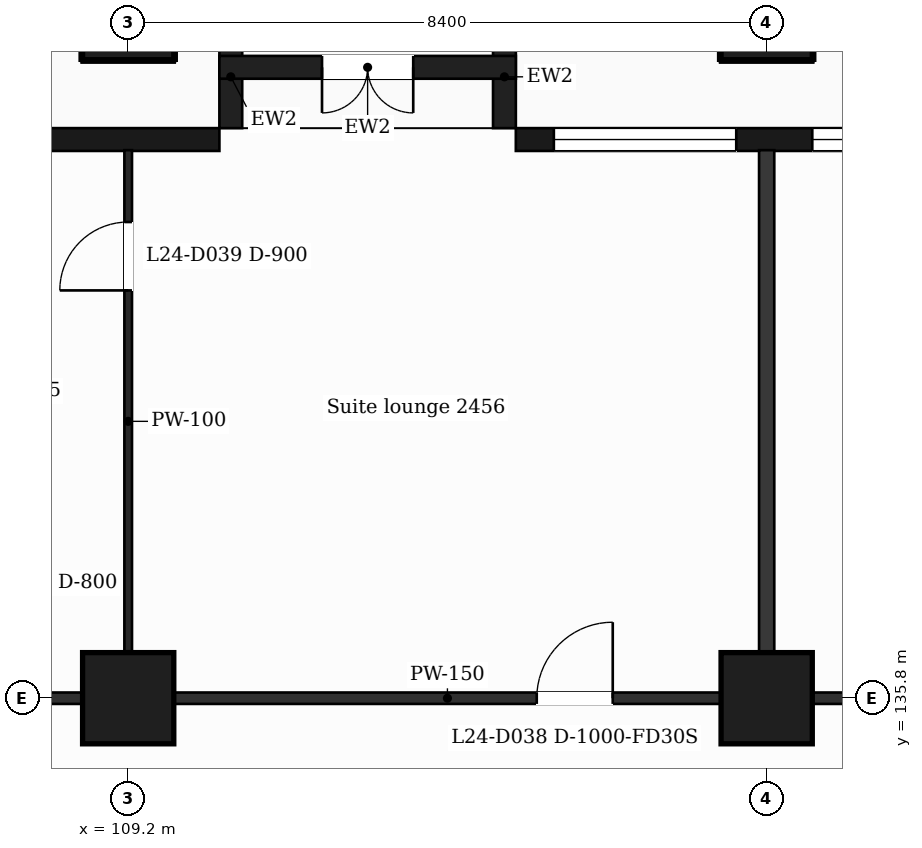
"""IFC4 building model, lengths in metres.
Left out: names, types, materials, properties, quantities, classifications, styles, units other than length and angle.
Written with IfcOpenShell. Run it as: python <this file> out.ifc"""

import sys

from ifc_helpers import new_model, si_unit, direction, frame, frame_2d, origin, origin_2d, place, context, subcontext, project, spatial, rectangle, extrude, element, fill, save


model = new_model("IFC4")
c1 = context("Model", 3, precision=1e-05, world=origin(), true_north=direction((0.0, 1.0)))
c2 = subcontext(c1, "Body", "Model", "MODEL_VIEW")
j1 = project(units=[si_unit("LENGTHUNIT", "METRE"), si_unit("PLANEANGLEUNIT", "RADIAN")], contexts=[c1])
p1 = place(None, origin())
s1 = spatial("IfcSite", under=j1, at=p1, CompositionType="ELEMENT")
p2 = place(p1, origin())
s2 = spatial("IfcBuilding", under=s1, at=p2, CompositionType="ELEMENT")
p3 = place(p2, frame((0.0, 0.0, 105.8)))
s3 = spatial("IfcBuildingStorey", under=s2, at=p3, CompositionType="ELEMENT", Elevation=105.8)
for number, where, z_axis, x_axis in (
    (1, (109.2, 135.8, 0.0), (0.0, 0.0, 1.0), (1.0, 0.0, 0.0)),
    (2, (117.6, 135.8, 0.0), (0.0, 0.0, 1.0), (1.0, 0.0, 0.0)),
    (3, (109.2, 144.8, 0.0), (0.0, 0.0, 1.0), (1.0, 0.0, 0.0)),
    (4, (117.6, 144.8, 0.0), (0.0, 0.0, 1.0), (1.0, 0.0, 0.0)),
):
    element("IfcColumn", number, at=place(p3, frame(where, z_axis=z_axis, x_axis=x_axis)), inside=s3, PredefinedType="COLUMN", context=c2, shape_type="SweptSolid", body=[
        extrude(rectangle(XDim=1.2, YDim=1.2, at=origin_2d()), origin(), (0.0, 0.0, 1.0), 3.7),
    ])
p4 = place(p3, frame((130.65, 143.15, 0.0), z_axis=(0.0, 0.0, 1.0), x_axis=(-1.0, 0.0, 0.0)))
e5 = element("IfcWall", 5, at=p4, inside=s3, PredefinedType="SOLIDWALL", context=c2, shape_type="SweptSolid", body=[
    extrude(rectangle(XDim=16.35, YDim=0.3, at=frame_2d((8.175, 0.0))), origin(), (0.0, 0.0, 1.0), 3.38),
])
p5 = place(p4, frame((1.35, 0.0, 0.9)))
e6 = element("IfcOpeningElement", 6, at=p5, cuts=e5, PredefinedType="OPENING", context=c2, shape_type="SweptSolid", body=[
    extrude(rectangle(XDim=2.4, YDim=2.1, at=frame_2d((1.2, 1.05))), frame((0.0, 0.16, 0.0), z_axis=(0.0, -1.0, 0.0), x_axis=(1.0, 0.0, 0.0)), (0.0, 0.0, 1.0), 0.32),
])
p6 = place(p4, frame((5.55, 0.0, 0.9)))
e7 = element("IfcOpeningElement", 7, at=p6, cuts=e5, PredefinedType="OPENING", context=c2, shape_type="SweptSolid", body=[
    extrude(rectangle(XDim=2.4, YDim=2.1, at=frame_2d((1.2, 1.05))), frame((0.0, 0.16, 0.0), z_axis=(0.0, -1.0, 0.0), x_axis=(1.0, 0.0, 0.0)), (0.0, 0.0, 1.0), 0.32),
])
p7 = place(p4, frame((9.45, 0.0, 0.0)))
e8 = element("IfcOpeningElement", 8, at=p7, cuts=e5, PredefinedType="OPENING", context=c2, shape_type="SweptSolid", body=[
    extrude(rectangle(XDim=1.2, YDim=2.4, at=frame_2d((0.6, 1.2))), frame((0.0, 0.16, 0.0), z_axis=(0.0, -1.0, 0.0), x_axis=(1.0, 0.0, 0.0)), (0.0, 0.0, 1.0), 0.32),
])
p8 = place(p4, frame((11.25, 0.0, 0.9)))
e9 = element("IfcOpeningElement", 9, at=p8, cuts=e5, PredefinedType="OPENING", context=c2, shape_type="SweptSolid", body=[
    extrude(rectangle(XDim=1.2, YDim=2.1, at=frame_2d((0.6, 1.05))), frame((0.0, 0.16, 0.0), z_axis=(0.0, -1.0, 0.0), x_axis=(1.0, 0.0, 0.0)), (0.0, 0.0, 1.0), 0.32),
])
p9 = place(p4, frame((13.45, 0.0, 0.9)))
e10 = element("IfcOpeningElement", 10, at=p9, cuts=e5, PredefinedType="OPENING", context=c2, shape_type="SweptSolid", body=[
    extrude(rectangle(XDim=2.4, YDim=2.1, at=frame_2d((1.2, 1.05))), frame((0.0, 0.16, 0.0), z_axis=(0.0, -1.0, 0.0), x_axis=(1.0, 0.0, 0.0)), (0.0, 0.0, 1.0), 0.32),
])
p10 = place(p3, frame((110.4, 143.15, 0.0), z_axis=(0.0, 0.0, 1.0), x_axis=(-1.0, 0.0, 0.0)))
e11 = element("IfcWall", 11, at=p10, inside=s3, PredefinedType="SOLIDWALL", context=c2, shape_type="SweptSolid", body=[
    extrude(rectangle(XDim=14.4, YDim=0.3, at=frame_2d((7.2, 0.0))), origin(), (0.0, 0.0, 1.0), 3.38),
])
p11 = place(p10, frame((2.7, 0.0, 0.9)))
e12 = element("IfcOpeningElement", 12, at=p11, cuts=e11, PredefinedType="OPENING", context=c2, shape_type="SweptSolid", body=[
    extrude(rectangle(XDim=1.2, YDim=2.1, at=frame_2d((0.6, 1.05))), frame((0.0, 0.16, 0.0), z_axis=(0.0, -1.0, 0.0), x_axis=(1.0, 0.0, 0.0)), (0.0, 0.0, 1.0), 0.32),
])
p12 = place(p10, frame((6.9, 0.0, 0.0)))
e13 = element("IfcOpeningElement", 13, at=p12, cuts=e11, PredefinedType="OPENING", context=c2, shape_type="SweptSolid", body=[
    extrude(rectangle(XDim=1.2, YDim=2.4, at=frame_2d((0.6, 1.2))), frame((0.0, 0.16, 0.0), z_axis=(0.0, -1.0, 0.0), x_axis=(1.0, 0.0, 0.0)), (0.0, 0.0, 1.0), 0.32),
])
p13 = place(p10, frame((10.5, 0.0, 0.9)))
e14 = element("IfcOpeningElement", 14, at=p13, cuts=e11, PredefinedType="OPENING", context=c2, shape_type="SweptSolid", body=[
    extrude(rectangle(XDim=2.4, YDim=2.1, at=frame_2d((1.2, 1.05))), frame((0.0, 0.16, 0.0), z_axis=(0.0, -1.0, 0.0), x_axis=(1.0, 0.0, 0.0)), (0.0, 0.0, 1.0), 0.32),
])
for number, where, z_axis, x_axis in (
    (15, (114.15, 143.3, 0.0), (0.0, 0.0, 1.0), (0.0, 1.0, 0.0)),
    (16, (110.55, 143.3, 0.0), (0.0, 0.0, 1.0), (0.0, 1.0, 0.0)),
):
    element("IfcWall", number, at=place(p3, frame(where, z_axis=z_axis, x_axis=x_axis)), inside=s3, PredefinedType="SOLIDWALL", context=c2, shape_type="SweptSolid", body=[
        extrude(rectangle(XDim=1.35, YDim=0.3, at=frame_2d((0.675, 0.0))), origin(), (0.0, 0.0, 1.0), 3.38),
    ])
p14 = place(p3, frame((114.3, 144.1, 0.0), z_axis=(0.0, 0.0, 1.0), x_axis=(-1.0, 0.0, 0.0)))
e17 = element("IfcWall", 17, at=p14, inside=s3, PredefinedType="SOLIDWALL", context=c2, shape_type="SweptSolid", body=[
    extrude(rectangle(XDim=3.9, YDim=0.3, at=frame_2d((1.95, 0.0))), origin(), (0.0, 0.0, 1.0), 3.38),
])
p15 = place(p14, frame((1.35, 0.0, 0.0)))
e18 = element("IfcOpeningElement", 18, at=p15, cuts=e17, PredefinedType="OPENING", context=c2, shape_type="SweptSolid", body=[
    extrude(rectangle(XDim=1.2, YDim=2.4, at=frame_2d((0.6, 1.2))), frame((0.0, 0.16, 0.0), z_axis=(0.0, -1.0, 0.0), x_axis=(1.0, 0.0, 0.0)), (0.0, 0.0, 1.0), 0.32),
])
p16 = place(p3, frame((90.895, 135.8, 0.0), z_axis=(0.0, 0.0, 1.0), x_axis=(1.0, 0.0, 0.0)))
e19 = element("IfcWall", 19, at=p16, inside=s3, PredefinedType="PARTITIONING", context=c2, shape_type="SweptSolid", body=[
    extrude(rectangle(XDim=45.011, YDim=0.15, at=frame_2d((22.505, 0.0))), origin(), (0.0, 0.0, 1.0), 3.38),
])
p17 = place(p16, frame((7.455, 0.0, 0.0)))
e20 = element("IfcOpeningElement", 20, at=p17, cuts=e19, PredefinedType="OPENING", context=c2, shape_type="SweptSolid", body=[
    extrude(rectangle(XDim=1.0, YDim=2.1, at=frame_2d((0.5, 1.05))), frame((0.0, 0.085, 0.0), z_axis=(0.0, -1.0, 0.0), x_axis=(1.0, 0.0, 0.0)), (0.0, 0.0, 1.0), 0.17),
])
p18 = place(p16, frame((10.892, 0.0, 0.0)))
e21 = element("IfcOpeningElement", 21, at=p18, cuts=e19, PredefinedType="OPENING", context=c2, shape_type="SweptSolid", body=[
    extrude(rectangle(XDim=0.95, YDim=2.1, at=frame_2d((0.475, 1.05))), frame((0.0, 0.085, 0.0), z_axis=(0.0, -1.0, 0.0), x_axis=(1.0, 0.0, 0.0)), (0.0, 0.0, 1.0), 0.17),
])
p19 = place(p16, frame((23.68, 0.0, 0.0)))
e22 = element("IfcOpeningElement", 22, at=p19, cuts=e19, PredefinedType="OPENING", context=c2, shape_type="SweptSolid", body=[
    extrude(rectangle(XDim=1.0, YDim=2.1, at=frame_2d((0.5, 1.05))), frame((0.0, 0.085, 0.0), z_axis=(0.0, -1.0, 0.0), x_axis=(1.0, 0.0, 0.0)), (0.0, 0.0, 1.0), 0.17),
])
p20 = place(p16, frame((30.318, 0.0, 0.0)))
e23 = element("IfcOpeningElement", 23, at=p20, cuts=e19, PredefinedType="OPENING", context=c2, shape_type="SweptSolid", body=[
    extrude(rectangle(XDim=0.95, YDim=2.1, at=frame_2d((0.475, 1.05))), frame((0.0, 0.085, 0.0), z_axis=(0.0, -1.0, 0.0), x_axis=(1.0, 0.0, 0.0)), (0.0, 0.0, 1.0), 0.17),
])
p21 = place(p16, frame((36.355, 0.0, 0.0)))
e24 = element("IfcOpeningElement", 24, at=p21, cuts=e19, PredefinedType="OPENING", context=c2, shape_type="SweptSolid", body=[
    extrude(rectangle(XDim=1.0, YDim=2.1, at=frame_2d((0.5, 1.05))), frame((0.0, 0.085, 0.0), z_axis=(0.0, -1.0, 0.0), x_axis=(1.0, 0.0, 0.0)), (0.0, 0.0, 1.0), 0.17),
])
p22 = place(p3, frame((109.2, 135.875, 0.0), z_axis=(0.0, 0.0, 1.0), x_axis=(0.0, 1.0, 0.0)))
e25 = element("IfcWall", 25, at=p22, inside=s3, PredefinedType="PARTITIONING", context=c2, shape_type="SweptSolid", body=[
    extrude(rectangle(XDim=7.135, YDim=0.1, at=frame_2d((3.567, 0.0))), origin(), (0.0, 0.0, 1.0), 3.38),
])
p23 = place(p22, frame((5.29, 0.0, 0.0)))
e26 = element("IfcOpeningElement", 26, at=p23, cuts=e25, PredefinedType="OPENING", context=c2, shape_type="SweptSolid", body=[
    extrude(rectangle(XDim=0.9, YDim=2.1, at=frame_2d((0.45, 1.05))), frame((0.0, 0.06, 0.0), z_axis=(0.0, -1.0, 0.0), x_axis=(1.0, 0.0, 0.0)), (0.0, 0.0, 1.0), 0.12),
])
p24 = place(p3, frame((117.6, 135.875, 0.0), z_axis=(0.0, 0.0, 1.0), x_axis=(0.0, 1.0, 0.0)))
e27 = element("IfcWall", 27, at=p24, inside=s3, PredefinedType="PARTITIONING", context=c2, shape_type="SweptSolid", body=[
    extrude(rectangle(XDim=7.135, YDim=0.2, at=frame_2d((3.567, 0.0))), origin(), (0.0, 0.0, 1.0), 3.38),
])
p25 = place(p8, origin())
e28 = element("IfcWindow", 28, at=p25, inside=s3, PartitioningType="SINGLE_PANEL", PredefinedType="WINDOW", context=c2, shape_type="SweptSolid", body=[
    extrude(rectangle(XDim=1.2, YDim=2.1, at=frame_2d((0.6, 1.05))), frame((0.0, 0.03, 0.0), z_axis=(0.0, -1.0, 0.0), x_axis=(1.0, 0.0, 0.0)), (0.0, 0.0, 1.0), 0.06),
])
fill(e9, e28)
p26 = place(p9, origin())
e29 = element("IfcWindow", 29, at=p26, inside=s3, PartitioningType="SINGLE_PANEL", PredefinedType="WINDOW", context=c2, shape_type="SweptSolid", body=[
    extrude(rectangle(XDim=2.4, YDim=2.1, at=frame_2d((1.2, 1.05))), frame((0.0, 0.03, 0.0), z_axis=(0.0, -1.0, 0.0), x_axis=(1.0, 0.0, 0.0)), (0.0, 0.0, 1.0), 0.06),
])
fill(e10, e29)
p27 = place(p15, origin())
e30 = element("IfcDoor", 30, at=p27, inside=s3, OperationType="DOUBLE_DOOR_SINGLE_SWING", PredefinedType="DOOR", context=c2, shape_type="SweptSolid", body=[
    extrude(rectangle(XDim=1.2, YDim=2.4, at=frame_2d((0.6, 1.2))), frame((0.0, 0.025, 0.0), z_axis=(0.0, -1.0, 0.0), x_axis=(1.0, 0.0, 0.0)), (0.0, 0.0, 1.0), 0.05),
])
fill(e18, e30)
p28 = place(p19, origin())
e31 = element("IfcDoor", 31, at=p28, inside=s3, OperationType="SINGLE_SWING_RIGHT", PredefinedType="DOOR", context=c2, shape_type="SweptSolid", body=[
    extrude(rectangle(XDim=1.0, YDim=2.1, at=frame_2d((0.5, 1.05))), frame((0.0, 0.025, 0.0), z_axis=(0.0, -1.0, 0.0), x_axis=(1.0, 0.0, 0.0)), (0.0, 0.0, 1.0), 0.05),
])
fill(e22, e31)
p29 = place(p23, origin())
e32 = element("IfcDoor", 32, at=p29, inside=s3, OperationType="SINGLE_SWING_LEFT", PredefinedType="DOOR", context=c2, shape_type="SweptSolid", body=[
    extrude(rectangle(XDim=0.9, YDim=2.1, at=frame_2d((0.45, 1.05))), frame((0.0, 0.025, 0.0), z_axis=(0.0, -1.0, 0.0), x_axis=(1.0, 0.0, 0.0)), (0.0, 0.0, 1.0), 0.05),
])
fill(e26, e32)
save(model, sys.argv[1])
